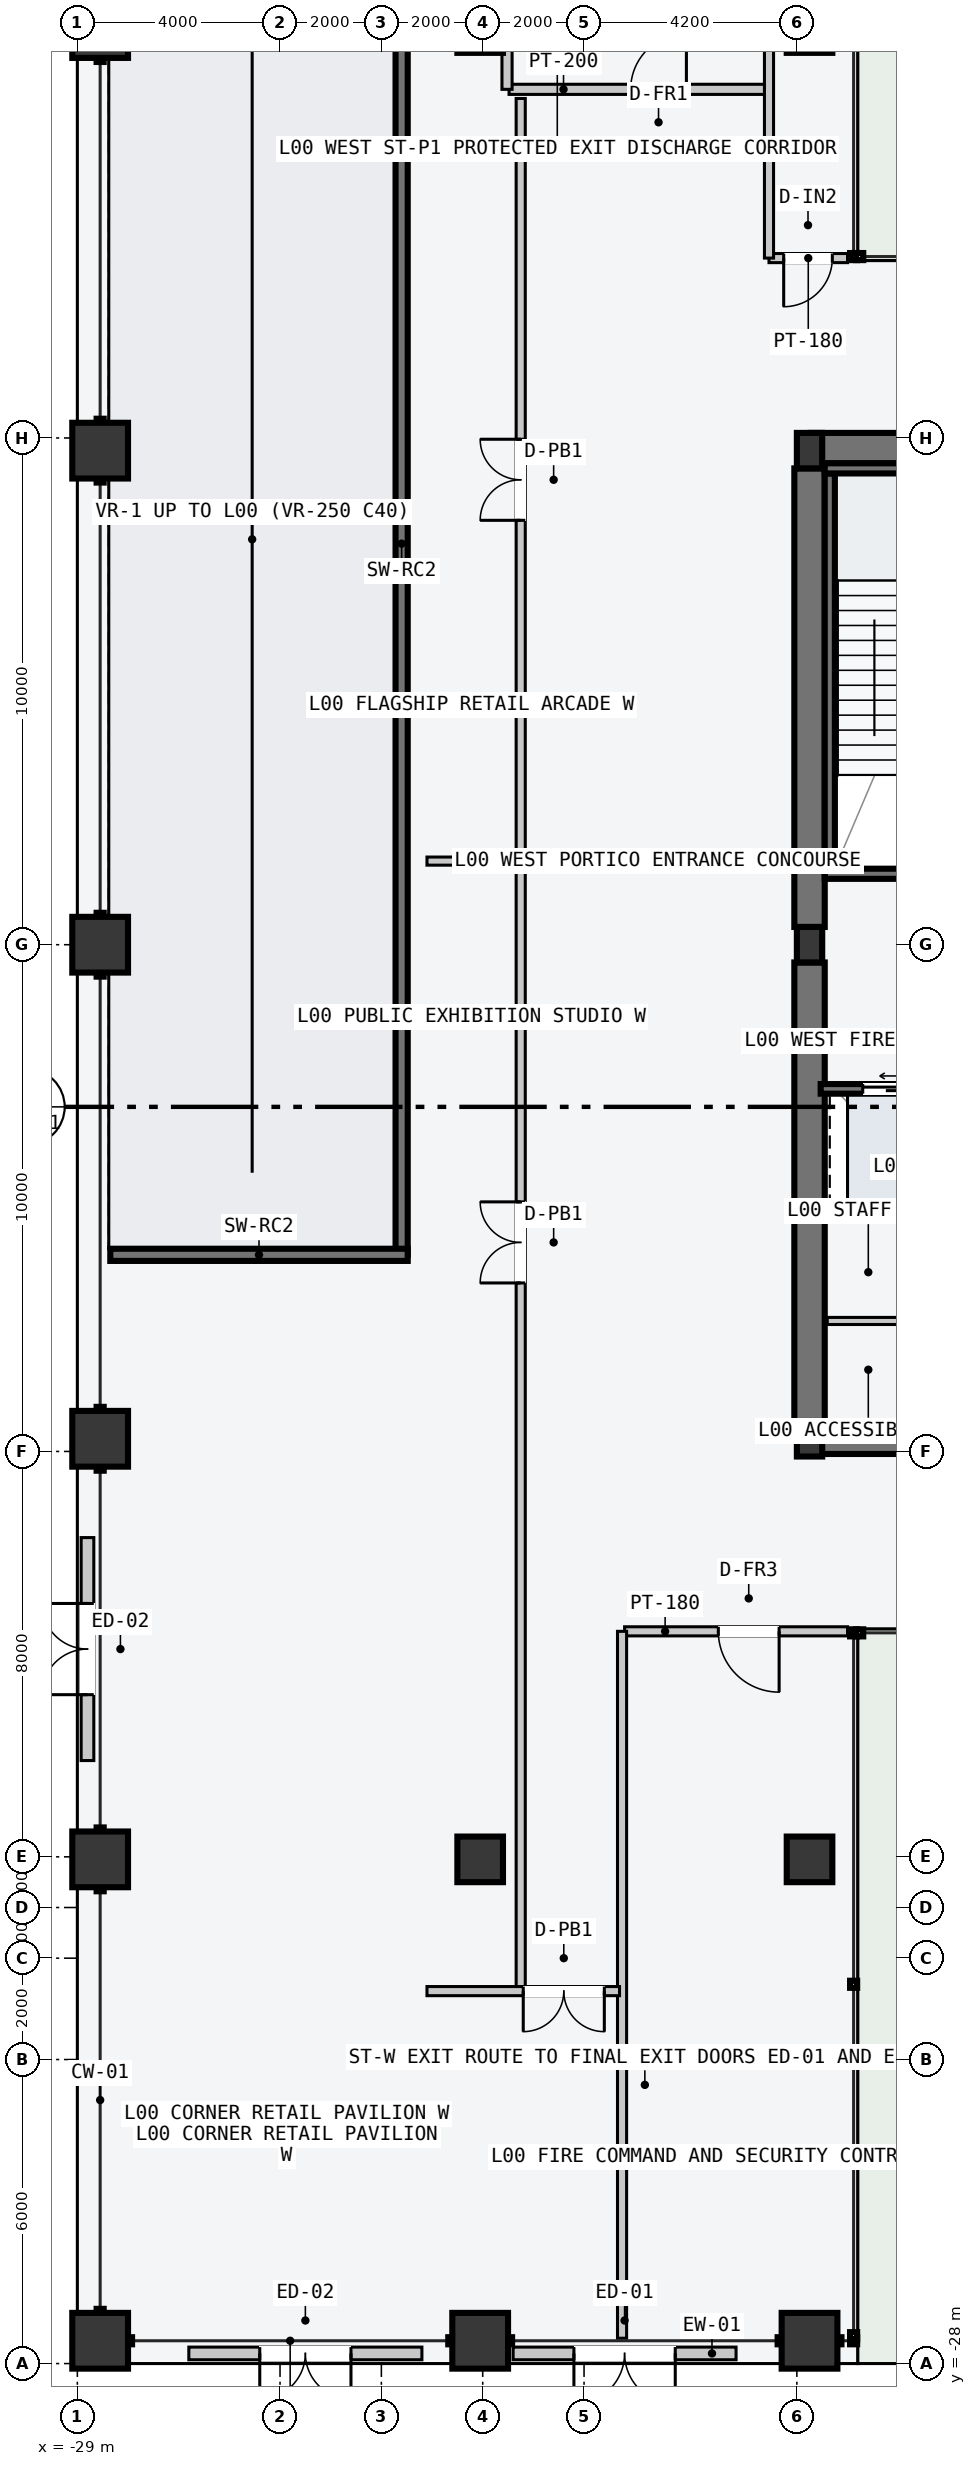
"""IFC4 building model, lengths in metres.
Left out: names, types, materials, properties, quantities, classifications, styles, units other than length and angle.
Written with IfcOpenShell. Run it as: python <this file> out.ifc"""

import sys

from ifc_helpers import new_model, si_unit, direction, frame, frame_2d, origin, origin_2d, place, context, subcontext, project, spatial, rectangle, hollow_rectangle, i_section, extrude, element, fill, save


model = new_model("IFC4")
c1 = context("Model", 3, precision=1e-05, world=origin(), true_north=direction((0.0, 1.0)))
c2 = subcontext(c1, "Body", "Model", "MODEL_VIEW")
j1 = project(units=[si_unit("LENGTHUNIT", "METRE"), si_unit("PLANEANGLEUNIT", "RADIAN")], contexts=[c1])
p1 = place(None, origin())
s1 = spatial("IfcSite", under=j1, at=p1, CompositionType="ELEMENT")
p2 = place(p1, origin())
s2 = spatial("IfcBuilding", under=s1, at=p2, CompositionType="ELEMENT")
p3 = place(p2, origin())
s3 = spatial("IfcBuildingStorey", under=s2, at=p3, CompositionType="ELEMENT", Elevation=0.0)
for number, where, z_axis, x_axis in (
    (1, (-14.53, -9.75, -0.22), (0.0, 0.0, 1.0), (1.0, 0.0, 0.0)),
    (2, (-14.53, 9.8, -0.22), (0.0, 0.0, 1.0), (1.0, 0.0, 0.0)),
):
    element("IfcWall", number, at=place(p3, frame(where, z_axis=z_axis, x_axis=x_axis)), inside=s3, PredefinedType="SHEAR", context=c2, shape_type="SweptSolid", body=[
        extrude(rectangle(XDim=6.46, YDim=0.6, at=frame_2d((3.23, 0.0))), origin(), (0.0, 0.0, 1.0), 4.8),
    ])
for number, where, z_axis, x_axis in (
    (3, (-14.55, -9.4, -0.22), (0.0, 0.0, 1.0), (0.0, 1.0, 0.0)),
    (4, (-14.55, 0.35, -0.22), (0.0, 0.0, 1.0), (0.0, 1.0, 0.0)),
):
    element("IfcWall", number, at=place(p3, frame(where, z_axis=z_axis, x_axis=x_axis)), inside=s3, PredefinedType="SHEAR", context=c2, shape_type="SweptSolid", body=[
        extrude(rectangle(XDim=9.05, YDim=0.6, at=frame_2d((4.525, 0.0))), origin(), (0.0, 0.0, 1.0), 4.8),
    ])
p4 = place(p3, frame((-14.15, 1.5, -0.22), z_axis=(0.0, 0.0, 1.0), x_axis=(0.0, 1.0, 0.0)))
e5 = element("IfcWall", 5, at=p4, inside=s3, PredefinedType="SOLIDWALL", context=c2, shape_type="SweptSolid", body=[
    extrude(rectangle(XDim=7.8, YDim=0.2, at=frame_2d((3.9, 0.0))), origin(), (0.0, 0.0, 1.0), 4.8),
])
p5 = place(p3, frame((-10.15, 1.4, -0.22), z_axis=(0.0, 0.0, 1.0), x_axis=(-1.0, 0.0, 0.0)))
e6 = element("IfcWall", 6, at=p5, inside=s3, PredefinedType="SOLIDWALL", context=c2, shape_type="SweptSolid", body=[
    extrude(rectangle(XDim=4.1, YDim=0.2, at=frame_2d((2.05, 0.0))), origin(), (0.0, 0.0, 1.0), 4.8),
])
p6 = place(p5, frame((1.5, 0.0, 0.22)))
e7 = element("IfcOpeningElement", 7, at=p6, cuts=e6, PredefinedType="OPENING", context=c2, shape_type="SweptSolid", body=[
    extrude(rectangle(XDim=1.12, YDim=2.18, at=frame_2d((0.56, 1.09))), frame((0.0, 0.11, 0.0), z_axis=(0.0, -1.0, 0.0), x_axis=(1.0, 0.0, 0.0)), (0.0, 0.0, 1.0), 0.22),
])
p7 = place(p3, frame((-14.25, 9.4, -0.22), z_axis=(0.0, 0.0, 1.0), x_axis=(1.0, 0.0, 0.0)))
e8 = element("IfcWall", 8, at=p7, inside=s3, PredefinedType="SOLIDWALL", context=c2, shape_type="SweptSolid", body=[
    extrude(rectangle(XDim=4.1, YDim=0.2, at=frame_2d((2.05, 0.0))), origin(), (0.0, 0.0, 1.0), 4.8),
])
p8 = place(p3, frame((-22.6, -6.12, -0.22), z_axis=(0.0, 0.0, 1.0), x_axis=(0.0, 1.0, 0.0)))
e9 = element("IfcWall", 9, at=p8, inside=s3, PredefinedType="SOLIDWALL", context=c2, shape_type="SweptSolid", body=[
    extrude(rectangle(XDim=28.07, YDim=0.24, at=frame_2d((14.035, 0.0))), origin(), (0.0, 0.0, 1.0), 4.8),
])
p9 = place(p3, frame((-28.35, -6.12, 0.0), z_axis=(0.0, 0.0, 1.0), x_axis=(1.0, 0.0, 0.0)))
e10 = element("IfcWall", 10, at=p9, inside=s3, PredefinedType="SOLIDWALL", context=c2, shape_type="SweptSolid", body=[
    extrude(rectangle(XDim=5.87, YDim=0.24, at=frame_2d((2.935, 0.0))), origin(), (0.0, 0.0, 1.0), 4.58),
])
for number, where, z_axis, x_axis in (
    (11, (-14.55, -9.75, 0.0), (0.0, 0.0, 1.0), (1.0, 0.0, 0.0)),
    (12, (-14.55, 0.0, 0.0), (0.0, 0.0, 1.0), (1.0, 0.0, 0.0)),
    (13, (-14.55, 9.75, 0.0), (0.0, 0.0, 1.0), (1.0, 0.0, 0.0)),
):
    element("IfcColumn", number, at=place(p3, frame(where, z_axis=z_axis, x_axis=x_axis)), inside=s3, PredefinedType="COLUMN", context=c2, shape_type="SweptSolid", body=[
        extrude(i_section(OverallWidth=0.5, OverallDepth=0.7, WebThickness=0.028, FlangeThickness=0.045, at=origin_2d()), origin(), (0.0, 0.0, 1.0), 4.8),
    ])
for number, where, z_axis, x_axis in (
    (14, (-21.05, -18.05, 0.0), (0.0, 0.0, 1.0), (1.0, 0.0, 0.0)),
    (15, (-14.55, -18.05, 0.0), (0.0, 0.0, 1.0), (1.0, 0.0, 0.0)),
    (16, (-21.05, 18.05, 0.0), (0.0, 0.0, 1.0), (1.0, 0.0, 0.0)),
    (17, (-14.55, 18.05, 0.0), (0.0, 0.0, 1.0), (1.0, 0.0, 0.0)),
):
    element("IfcColumn", number, at=place(p3, frame(where, z_axis=z_axis, x_axis=x_axis)), inside=s3, PredefinedType="COLUMN", context=c2, shape_type="SweptSolid", body=[
        extrude(hollow_rectangle(XDim=0.9, YDim=0.9, WallThickness=0.045, at=origin_2d()), origin(), (0.0, 0.0, 1.0), 4.8),
    ])
for number, where, z_axis, x_axis in (
    (18, (-28.55, -27.55, 0.0), (0.0, 0.0, 1.0), (1.0, 0.0, 0.0)),
    (19, (-21.05, -27.55, 0.0), (0.0, 0.0, 1.0), (1.0, 0.0, 0.0)),
    (20, (-14.55, -27.55, 0.0), (0.0, 0.0, 1.0), (1.0, 0.0, 0.0)),
    (21, (-28.55, -18.05, 0.0), (0.0, 0.0, 1.0), (0.0, 1.0, 0.0)),
    (22, (-28.55, -9.75, 0.0), (0.0, 0.0, 1.0), (0.0, 1.0, 0.0)),
    (23, (-28.55, 0.0, 0.0), (0.0, 0.0, 1.0), (0.0, 1.0, 0.0)),
    (24, (-28.55, 9.75, 0.0), (0.0, 0.0, 1.0), (0.0, 1.0, 0.0)),
    (25, (-28.55, 18.05, 0.0), (0.0, 0.0, 1.0), (0.0, 1.0, 0.0)),
):
    element("IfcColumn", number, at=place(p3, frame(where, z_axis=z_axis, x_axis=x_axis)), inside=s3, PredefinedType="COLUMN", context=c2, shape_type="SweptSolid", body=[
        extrude(hollow_rectangle(XDim=1.1, YDim=1.1, WallThickness=0.055, at=origin_2d()), origin(), (0.0, 0.0, 1.0), 4.8),
    ])
p10 = place(p3, frame((-14.33, -2.845, -0.22), z_axis=(0.0, 0.0, 1.0), x_axis=(1.0, 0.0, 0.0)))
e26 = element("IfcWall", 26, at=p10, inside=s3, PredefinedType="SOLIDWALL", context=c2, shape_type="SweptSolid", body=[
    extrude(rectangle(XDim=2.68, YDim=0.19, at=frame_2d((1.34, 0.0))), origin(), (0.0, 0.0, 1.0), 4.8),
])
p11 = place(p10, frame((0.83, 0.0, 0.22)))
e27 = element("IfcOpeningElement", 27, at=p11, cuts=e26, PredefinedType="OPENING", context=c2, shape_type="SweptSolid", body=[
    extrude(rectangle(XDim=1.2, YDim=2.2, at=frame_2d((0.6, 1.1))), frame((0.0, 0.105, 0.0), z_axis=(0.0, -1.0, 0.0), x_axis=(1.0, 0.0, 0.0)), (0.0, 0.0, 1.0), 0.21),
])
p12 = place(p3, frame((-14.33, -5.255, -0.22), z_axis=(0.0, 0.0, 1.0), x_axis=(1.0, 0.0, 0.0)))
e28 = element("IfcWall", 28, at=p12, inside=s3, PredefinedType="SOLIDWALL", context=c2, shape_type="SweptSolid", body=[
    extrude(rectangle(XDim=2.68, YDim=0.19, at=frame_2d((1.34, 0.0))), origin(), (0.0, 0.0, 1.0), 4.8),
])
p13 = place(p3, frame((-11.7, -7.425, 0.0), z_axis=(0.0, 0.0, 1.0), x_axis=(-1.0, 0.0, 0.0)))
e29 = element("IfcWall", 29, at=p13, inside=s3, PredefinedType="PARTITIONING", context=c2, shape_type="SweptSolid", body=[
    extrude(rectangle(XDim=2.5, YDim=0.14, at=frame_2d((1.25, 0.0))), origin(), (0.0, 0.0, 1.0), 4.58),
])
p14 = place(p3, frame((-20.48, 16.88, 0.0), z_axis=(0.0, 0.0, 1.0), x_axis=(1.0, 0.0, 0.0)))
e30 = element("IfcWall", 30, at=p14, inside=s3, PredefinedType="PARTITIONING", context=c2, shape_type="SweptSolid", body=[
    extrude(rectangle(XDim=5.1, YDim=0.2, at=frame_2d((2.55, 0.0))), origin(), (0.0, 0.0, 1.0), 4.58),
])
p15 = place(p14, frame((2.4, 0.0, 0.0)))
e31 = element("IfcOpeningElement", 31, at=p15, cuts=e30, PredefinedType="OPENING", context=c2, shape_type="SweptSolid", body=[
    extrude(rectangle(XDim=1.1, YDim=2.15, at=frame_2d((0.55, 1.075))), frame((0.0, 0.11, 0.0), z_axis=(0.0, -1.0, 0.0), x_axis=(1.0, 0.0, 0.0)), (0.0, 0.0, 1.0), 0.22),
])
p16 = place(p3, frame((-20.52, 16.88, 0.0), z_axis=(0.0, 0.0, 1.0), x_axis=(0.0, 1.0, 0.0)))
e32 = element("IfcWall", 32, at=p16, inside=s3, PredefinedType="PARTITIONING", context=c2, shape_type="SweptSolid", body=[
    extrude(rectangle(XDim=10.77, YDim=0.2, at=frame_2d((5.385, 0.0))), origin(), (0.0, 0.0, 1.0), 4.58),
])
p17 = place(p3, frame((-20.35, 1.65, 0.0), z_axis=(0.0, 0.0, 1.0), x_axis=(-1.0, 0.0, 0.0)))
e33 = element("IfcWall", 33, at=p17, inside=s3, PredefinedType="PARTITIONING", context=c2, shape_type="SweptSolid", body=[
    extrude(rectangle(XDim=1.75, YDim=0.16, at=frame_2d((0.875, 0.0))), origin(), (0.0, 0.0, 1.0), 4.58),
])
p18 = place(p3, frame((-20.25, -20.6, 0.0), z_axis=(0.0, 0.0, 1.0), x_axis=(0.0, 1.0, 0.0)))
e34 = element("IfcWall", 34, at=p18, inside=s3, PredefinedType="PARTITIONING", context=c2, shape_type="SweptSolid", body=[
    extrude(rectangle(XDim=37.3, YDim=0.18, at=frame_2d((18.65, 0.0))), origin(), (0.0, 0.0, 1.0), 4.58),
])
p19 = place(p18, frame((13.925, 0.0, 0.0)))
e35 = element("IfcOpeningElement", 35, at=p19, cuts=e34, PredefinedType="OPENING", context=c2, shape_type="SweptSolid", body=[
    extrude(rectangle(XDim=1.6, YDim=2.3, at=frame_2d((0.8, 1.15))), frame((0.0, 0.1, 0.0), z_axis=(0.0, -1.0, 0.0), x_axis=(1.0, 0.0, 0.0)), (0.0, 0.0, 1.0), 0.2),
])
p20 = place(p18, frame((28.975, 0.0, 0.0)))
e36 = element("IfcOpeningElement", 36, at=p20, cuts=e34, PredefinedType="OPENING", context=c2, shape_type="SweptSolid", body=[
    extrude(rectangle(XDim=1.6, YDim=2.3, at=frame_2d((0.8, 1.15))), frame((0.0, 0.1, 0.0), z_axis=(0.0, -1.0, 0.0), x_axis=(1.0, 0.0, 0.0)), (0.0, 0.0, 1.0), 0.2),
])
p21 = place(p3, frame((-13.8, -13.55, 0.0), z_axis=(0.0, 0.0, 1.0), x_axis=(-1.0, 0.0, 0.0)))
e37 = element("IfcWall", 37, at=p21, inside=s3, PredefinedType="PARTITIONING", context=c2, shape_type="SweptSolid", body=[
    extrude(rectangle(XDim=4.4, YDim=0.18, at=frame_2d((2.2, 0.0))), origin(), (0.0, 0.0, 1.0), 4.58),
])
p22 = place(p21, frame((1.35, 0.0, 0.0)))
e38 = element("IfcOpeningElement", 38, at=p22, cuts=e37, PredefinedType="OPENING", context=c2, shape_type="SweptSolid", body=[
    extrude(rectangle(XDim=1.2, YDim=2.22, at=frame_2d((0.6, 1.11))), frame((0.0, 0.1, 0.0), z_axis=(0.0, -1.0, 0.0), x_axis=(1.0, 0.0, 0.0)), (0.0, 0.0, 1.0), 0.2),
])
p23 = place(p3, frame((-18.25, -27.5, 0.0), z_axis=(0.0, 0.0, 1.0), x_axis=(0.0, 1.0, 0.0)))
e39 = element("IfcWall", 39, at=p23, inside=s3, PredefinedType="PARTITIONING", context=c2, shape_type="SweptSolid", body=[
    extrude(rectangle(XDim=13.95, YDim=0.18, at=frame_2d((6.975, 0.0))), origin(), (0.0, 0.0, 1.0), 4.58),
])
p24 = place(p3, frame((-18.3, -20.65, 0.0), z_axis=(0.0, 0.0, 1.0), x_axis=(-1.0, 0.0, 0.0)))
e40 = element("IfcWall", 40, at=p24, inside=s3, PredefinedType="PARTITIONING", context=c2, shape_type="SweptSolid", body=[
    extrude(rectangle(XDim=3.8, YDim=0.18, at=frame_2d((1.9, 0.0))), origin(), (0.0, 0.0, 1.0), 4.58),
])
p25 = place(p24, frame((0.3, 0.0, 0.0)))
e41 = element("IfcOpeningElement", 41, at=p25, cuts=e40, PredefinedType="OPENING", context=c2, shape_type="SweptSolid", body=[
    extrude(rectangle(XDim=1.6, YDim=2.3, at=frame_2d((0.8, 1.15))), frame((0.0, 0.1, 0.0), z_axis=(0.0, -1.0, 0.0), x_axis=(1.0, 0.0, 0.0)), (0.0, 0.0, 1.0), 0.2),
])
p26 = place(p3, frame((-13.8, 13.55, 0.0), z_axis=(0.0, 0.0, 1.0), x_axis=(-1.0, 0.0, 0.0)))
e42 = element("IfcWall", 42, at=p26, inside=s3, PredefinedType="PARTITIONING", context=c2, shape_type="SweptSolid", body=[
    extrude(rectangle(XDim=1.55, YDim=0.18, at=frame_2d((0.775, 0.0))), origin(), (0.0, 0.0, 1.0), 4.58),
])
p27 = place(p26, frame((0.3, 0.0, 0.0)))
e43 = element("IfcOpeningElement", 43, at=p27, cuts=e42, PredefinedType="OPENING", context=c2, shape_type="SweptSolid", body=[
    extrude(rectangle(XDim=0.96, YDim=2.18, at=frame_2d((0.48, 1.09))), frame((0.0, 0.1, 0.0), z_axis=(0.0, -1.0, 0.0), x_axis=(1.0, 0.0, 0.0)), (0.0, 0.0, 1.0), 0.2),
])
p28 = place(p3, frame((-15.35, 13.55, 0.0), z_axis=(0.0, 0.0, 1.0), x_axis=(0.0, 1.0, 0.0)))
e44 = element("IfcWall", 44, at=p28, inside=s3, PredefinedType="PARTITIONING", context=c2, shape_type="SweptSolid", body=[
    extrude(rectangle(XDim=5.25, YDim=0.18, at=frame_2d((2.625, 0.0))), origin(), (0.0, 0.0, 1.0), 4.58),
])
p29 = place(p3, frame((-16.0, -27.8, 0.0), z_axis=(0.0, 0.0, 1.0), x_axis=(-1.0, 0.0, 0.0)))
e45 = element("IfcWall", 45, at=p29, inside=s3, PredefinedType="STANDARD", context=c2, shape_type="SweptSolid", body=[
    extrude(rectangle(XDim=4.4, YDim=0.25, at=frame_2d((2.2, 0.0))), origin(), (0.0, 0.0, 1.0), 4.58),
])
p30 = place(p29, frame((1.2, 0.0, 0.0)))
e46 = element("IfcOpeningElement", 46, at=p30, cuts=e45, PredefinedType="OPENING", context=c2, shape_type="SweptSolid", body=[
    extrude(rectangle(XDim=2.0, YDim=2.4, at=frame_2d((1.0, 1.2))), frame((0.0, 0.135, 0.0), z_axis=(0.0, -1.0, 0.0), x_axis=(1.0, 0.0, 0.0)), (0.0, 0.0, 1.0), 0.27),
])
p31 = place(p3, frame((-22.2, -27.8, 0.0), z_axis=(0.0, 0.0, 1.0), x_axis=(-1.0, 0.0, 0.0)))
e47 = element("IfcWall", 47, at=p31, inside=s3, PredefinedType="STANDARD", context=c2, shape_type="SweptSolid", body=[
    extrude(rectangle(XDim=4.6, YDim=0.25, at=frame_2d((2.3, 0.0))), origin(), (0.0, 0.0, 1.0), 4.58),
])
p32 = place(p31, frame((1.4, 0.0, 0.0)))
e48 = element("IfcOpeningElement", 48, at=p32, cuts=e47, PredefinedType="OPENING", context=c2, shape_type="SweptSolid", body=[
    extrude(rectangle(XDim=1.8, YDim=2.4, at=frame_2d((0.9, 1.2))), frame((0.0, 0.135, 0.0), z_axis=(0.0, -1.0, 0.0), x_axis=(1.0, 0.0, 0.0)), (0.0, 0.0, 1.0), 0.27),
])
p33 = place(p3, frame((-28.8, -16.1, 0.0), z_axis=(0.0, 0.0, 1.0), x_axis=(0.0, 1.0, 0.0)))
e49 = element("IfcWall", 49, at=p33, inside=s3, PredefinedType="STANDARD", context=c2, shape_type="SweptSolid", body=[
    extrude(rectangle(XDim=4.4, YDim=0.25, at=frame_2d((2.2, 0.0))), origin(), (0.0, 0.0, 1.0), 4.58),
])
p34 = place(p33, frame((1.3, 0.0, 0.0)))
e50 = element("IfcOpeningElement", 50, at=p34, cuts=e49, PredefinedType="OPENING", context=c2, shape_type="SweptSolid", body=[
    extrude(rectangle(XDim=1.8, YDim=2.4, at=frame_2d((0.9, 1.2))), frame((0.0, 0.135, 0.0), z_axis=(0.0, -1.0, 0.0), x_axis=(1.0, 0.0, 0.0)), (0.0, 0.0, 1.0), 0.27),
])
p35 = place(p11, origin())
e51 = element("IfcDoor", 51, at=p35, inside=s3, OperationType="SLIDING_TO_LEFT", PredefinedType="DOOR", context=c2, shape_type="SweptSolid", body=[
    extrude(rectangle(XDim=1.2, YDim=2.2, at=frame_2d((0.6, 1.1))), frame((0.0, 0.025, 0.0), z_axis=(0.0, -1.0, 0.0), x_axis=(1.0, 0.0, 0.0)), (0.0, 0.0, 1.0), 0.05),
])
fill(e27, e51)
p36 = place(p15, origin())
e52 = element("IfcDoor", 52, at=p36, inside=s3, OperationType="SINGLE_SWING_RIGHT", PredefinedType="DOOR", context=c2, shape_type="SweptSolid", body=[
    extrude(rectangle(XDim=1.1, YDim=2.15, at=frame_2d((0.55, 1.075))), frame((0.0, 0.025, 0.0), z_axis=(0.0, -1.0, 0.0), x_axis=(1.0, 0.0, 0.0)), (0.0, 0.0, 1.0), 0.05),
])
fill(e31, e52)
p37 = place(p19, origin())
e53 = element("IfcDoor", 53, at=p37, inside=s3, OperationType="DOUBLE_DOOR_SINGLE_SWING", PredefinedType="DOOR", context=c2, shape_type="SweptSolid", body=[
    extrude(rectangle(XDim=1.6, YDim=2.3, at=frame_2d((0.8, 1.15))), frame((0.0, 0.025, 0.0), z_axis=(0.0, -1.0, 0.0), x_axis=(1.0, 0.0, 0.0)), (0.0, 0.0, 1.0), 0.05),
])
fill(e35, e53)
p38 = place(p20, origin())
e54 = element("IfcDoor", 54, at=p38, inside=s3, OperationType="DOUBLE_DOOR_SINGLE_SWING", PredefinedType="DOOR", context=c2, shape_type="SweptSolid", body=[
    extrude(rectangle(XDim=1.6, YDim=2.3, at=frame_2d((0.8, 1.15))), frame((0.0, 0.025, 0.0), z_axis=(0.0, -1.0, 0.0), x_axis=(1.0, 0.0, 0.0)), (0.0, 0.0, 1.0), 0.05),
])
fill(e36, e54)
p39 = place(p22, origin())
e55 = element("IfcDoor", 55, at=p39, inside=s3, OperationType="SINGLE_SWING_LEFT", PredefinedType="DOOR", context=c2, shape_type="SweptSolid", body=[
    extrude(rectangle(XDim=1.2, YDim=2.22, at=frame_2d((0.6, 1.11))), frame((0.0, 0.025, 0.0), z_axis=(0.0, -1.0, 0.0), x_axis=(1.0, 0.0, 0.0)), (0.0, 0.0, 1.0), 0.05),
])
fill(e38, e55)
p40 = place(p25, origin())
e56 = element("IfcDoor", 56, at=p40, inside=s3, OperationType="DOUBLE_DOOR_SINGLE_SWING", PredefinedType="DOOR", context=c2, shape_type="SweptSolid", body=[
    extrude(rectangle(XDim=1.6, YDim=2.3, at=frame_2d((0.8, 1.15))), frame((0.0, 0.025, 0.0), z_axis=(0.0, -1.0, 0.0), x_axis=(1.0, 0.0, 0.0)), (0.0, 0.0, 1.0), 0.05),
])
fill(e41, e56)
p41 = place(p27, origin())
e57 = element("IfcDoor", 57, at=p41, inside=s3, OperationType="SINGLE_SWING_RIGHT", PredefinedType="DOOR", context=c2, shape_type="SweptSolid", body=[
    extrude(rectangle(XDim=0.96, YDim=2.18, at=frame_2d((0.48, 1.09))), frame((0.0, 0.025, 0.0), z_axis=(0.0, -1.0, 0.0), x_axis=(1.0, 0.0, 0.0)), (0.0, 0.0, 1.0), 0.05),
])
fill(e43, e57)
p42 = place(p30, origin())
e58 = element("IfcDoor", 58, at=p42, inside=s3, OperationType="DOUBLE_DOOR_SINGLE_SWING", PredefinedType="DOOR", context=c2, shape_type="SweptSolid", body=[
    extrude(rectangle(XDim=2.0, YDim=2.4, at=frame_2d((1.0, 1.2))), frame((0.0, 0.025, 0.0), z_axis=(0.0, -1.0, 0.0), x_axis=(1.0, 0.0, 0.0)), (0.0, 0.0, 1.0), 0.05),
])
fill(e46, e58)
p43 = place(p32, origin())
e59 = element("IfcDoor", 59, at=p43, inside=s3, OperationType="DOUBLE_DOOR_SINGLE_SWING", PredefinedType="DOOR", context=c2, shape_type="SweptSolid", body=[
    extrude(rectangle(XDim=1.8, YDim=2.4, at=frame_2d((0.9, 1.2))), frame((0.0, 0.025, 0.0), z_axis=(0.0, -1.0, 0.0), x_axis=(1.0, 0.0, 0.0)), (0.0, 0.0, 1.0), 0.05),
])
fill(e48, e59)
p44 = place(p34, origin())
e60 = element("IfcDoor", 60, at=p44, inside=s3, OperationType="DOUBLE_DOOR_SINGLE_SWING", PredefinedType="DOOR", context=c2, shape_type="SweptSolid", body=[
    extrude(rectangle(XDim=1.8, YDim=2.4, at=frame_2d((0.9, 1.2))), frame((0.0, 0.025, 0.0), z_axis=(0.0, -1.0, 0.0), x_axis=(1.0, 0.0, 0.0)), (0.0, 0.0, 1.0), 0.05),
])
fill(e50, e60)
save(model, sys.argv[1])
